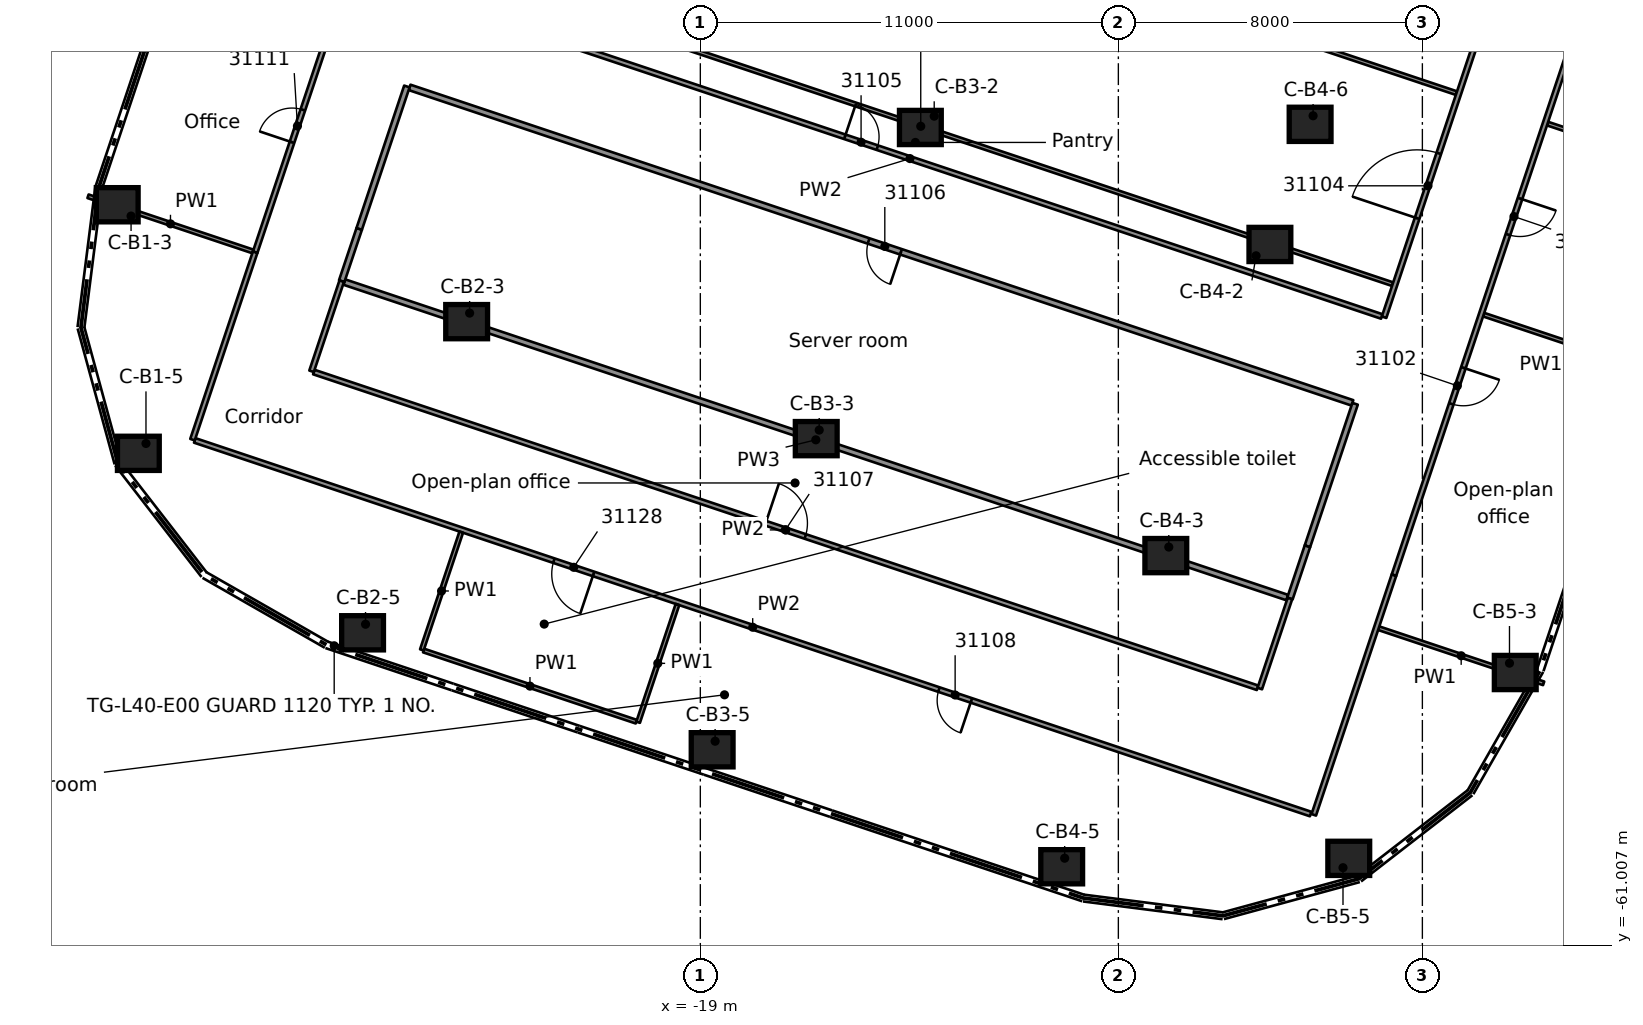
"""IFC4 building model, lengths in metres.
Left out: names, types, materials, properties, quantities, classifications, styles, units other than length and angle.
Written with IfcOpenShell. Run it as: python <this file> out.ifc"""

import sys

from ifc_helpers import new_model, si_unit, direction, frame, frame_2d, origin, origin_2d, place, context, subcontext, project, spatial, rectangle, extrude, element, fill, save


model = new_model("IFC4")
c1 = context("Model", 3, precision=1e-05, world=origin(), true_north=direction((0.0, 1.0)))
c2 = subcontext(c1, "Body", "Model", "MODEL_VIEW")
j1 = project(units=[si_unit("LENGTHUNIT", "METRE"), si_unit("PLANEANGLEUNIT", "RADIAN")], contexts=[c1])
p1 = place(None, origin())
s1 = spatial("IfcSite", under=j1, at=p1, CompositionType="ELEMENT")
p2 = place(p1, origin())
s2 = spatial("IfcBuilding", under=s1, at=p2, CompositionType="ELEMENT")
p3 = place(p2, frame((0.0, 0.0, 156.1)))
s3 = spatial("IfcBuildingStorey", under=s2, at=p3, CompositionType="ELEMENT", Elevation=156.1)
for number, where, z_axis, x_axis in (
    (1, (-34.344, -41.515, 0.0), (0.0, 0.0, 1.0), (1.0, 0.0, 0.0)),
    (2, (-33.788, -48.056, 0.0), (0.0, 0.0, 1.0), (1.0, 0.0, 0.0)),
    (3, (-25.149, -44.591, 0.0), (0.0, 0.0, 1.0), (1.0, 0.0, 0.0)),
    (4, (-27.888, -52.778, 0.0), (0.0, 0.0, 1.0), (1.0, 0.0, 0.0)),
    (5, (-13.21, -39.482, 0.0), (0.0, 0.0, 1.0), (1.0, 0.0, 0.0)),
    (6, (-15.95, -47.669, 0.0), (0.0, 0.0, 1.0), (1.0, 0.0, 0.0)),
    (7, (-18.689, -55.856, 0.0), (0.0, 0.0, 1.0), (1.0, 0.0, 0.0)),
    (8, (-4.012, -42.56, 0.0), (0.0, 0.0, 1.0), (1.0, 0.0, 0.0)),
    (9, (-6.751, -50.747, 0.0), (0.0, 0.0, 1.0), (1.0, 0.0, 0.0)),
    (10, (-9.491, -58.934, 0.0), (0.0, 0.0, 1.0), (1.0, 0.0, 0.0)),
    (11, (-2.954, -39.399, 0.0), (0.0, 0.0, 1.0), (1.0, 0.0, 0.0)),
    (12, (2.444, -53.823, 0.0), (0.0, 0.0, 1.0), (1.0, 0.0, 0.0)),
    (13, (-1.937, -58.713, 0.0), (0.0, 0.0, 1.0), (1.0, 0.0, 0.0)),
):
    element("IfcColumn", number, at=place(p3, frame(where, z_axis=z_axis, x_axis=x_axis)), inside=s3, PredefinedType="COLUMN", context=c2, shape_type="SweptSolid", body=[
        extrude(rectangle(XDim=1.1, YDim=0.9, at=origin_2d()), origin(), (0.0, 0.0, 1.0), 3.5),
    ])
p4 = place(p3, frame((-26.281, -53.245, 0.0), z_axis=(0.0, 0.0, 1.0), x_axis=(0.948351779966, -0.317220587976, 0.0)))
e14 = element("IfcWall", 14, at=p4, inside=s3, PredefinedType="PARTITIONING", context=c2, shape_type="SweptSolid", body=[
    extrude(rectangle(XDim=5.901, YDim=0.1, at=frame_2d((2.95, 0.0))), origin(), (0.0, 0.0, 1.0), 3.08),
])
p5 = place(p3, frame((-2.94, -57.547, 0.0), z_axis=(0.0, 0.0, 1.0), x_axis=(-0.948265401731, 0.317478704609, 0.0)))
e15 = element("IfcWall", 15, at=p5, inside=s3, PredefinedType="PARTITIONING", context=c2, shape_type="SweptSolid", body=[
    extrude(rectangle(XDim=30.966, YDim=0.125, at=frame_2d((15.483, 0.0))), origin(), (0.0, 0.0, 1.0), 3.08),
])
p6 = place(p5, frame((9.415, 0.0, 0.0)))
e16 = element("IfcOpeningElement", 16, at=p6, cuts=e15, PredefinedType="OPENING", context=c2, shape_type="SweptSolid", body=[
    extrude(rectangle(XDim=0.9, YDim=2.1, at=frame_2d((0.45, 1.05))), frame((0.0, 0.073, 0.0), z_axis=(0.0, -1.0, 0.0), x_axis=(1.0, 0.0, 0.0)), (0.0, 0.0, 1.0), 0.145),
])
p7 = place(p5, frame((19.9, 0.0, 0.0)))
e17 = element("IfcOpeningElement", 17, at=p7, cuts=e15, PredefinedType="OPENING", context=c2, shape_type="SweptSolid", body=[
    extrude(rectangle(XDim=1.1, YDim=2.1, at=frame_2d((0.55, 1.05))), frame((0.0, 0.073, 0.0), z_axis=(0.0, -1.0, 0.0), x_axis=(1.0, 0.0, 0.0)), (0.0, 0.0, 1.0), 0.145),
])
p8 = place(p3, frame((-29.171, -45.917, 0.0), z_axis=(0.0, 0.0, 1.0), x_axis=(0.948337781815, -0.317262433299, 0.0)))
e18 = element("IfcWall", 18, at=p8, inside=s3, PredefinedType="PARTITIONING", context=c2, shape_type="SweptSolid", body=[
    extrude(rectangle(XDim=26.187, YDim=0.125, at=frame_2d((13.093, 0.0))), origin(), (0.0, 0.0, 1.0), 3.08),
])
p9 = place(p8, frame((12.538, 0.0, 0.0)))
e19 = element("IfcOpeningElement", 19, at=p9, cuts=e18, PredefinedType="OPENING", context=c2, shape_type="SweptSolid", body=[
    extrude(rectangle(XDim=1.1, YDim=2.1, at=frame_2d((0.55, 1.05))), frame((0.0, 0.073, 0.0), z_axis=(0.0, -1.0, 0.0), x_axis=(1.0, 0.0, 0.0)), (0.0, 0.0, 1.0), 0.145),
])
p10 = place(p3, frame((-35.112, -41.292, 0.0), z_axis=(0.0, 0.0, 1.0), x_axis=(0.94831984375, -0.317316047419, 0.0)))
e20 = element("IfcWall", 20, at=p10, inside=s3, PredefinedType="PARTITIONING", context=c2, shape_type="SweptSolid", body=[
    extrude(rectangle(XDim=4.576, YDim=0.1, at=frame_2d((2.288, 0.0))), origin(), (0.0, 0.0, 1.0), 3.08),
])
p11 = place(p3, frame((-28.366, -43.55, 0.0), z_axis=(0.0, 0.0, 1.0), x_axis=(0.948327152728, -0.317294203223, 0.0)))
e21 = element("IfcWall", 21, at=p11, inside=s3, PredefinedType="PARTITIONING", context=c2, shape_type="SweptSolid", body=[
    extrude(rectangle(XDim=26.162, YDim=0.15, at=frame_2d((13.081, 0.0))), origin(), (0.0, 0.0, 1.0), 3.08),
])
p12 = place(p3, frame((-1.149, -52.657, 0.0), z_axis=(0.0, 0.0, 1.0), x_axis=(0.948400148701, -0.317075949805, 0.0)))
e22 = element("IfcWall", 22, at=p12, inside=s3, PredefinedType="PARTITIONING", context=c2, shape_type="SweptSolid", body=[
    extrude(rectangle(XDim=4.576, YDim=0.1, at=frame_2d((2.288, 0.0))), origin(), (0.0, 0.0, 1.0), 3.08),
])
p13 = place(p3, frame((-1.841, -46.728, 0.0), z_axis=(0.0, 0.0, 1.0), x_axis=(-0.94832621322, 0.317297011205, 0.0)))
e23 = element("IfcWall", 23, at=p13, inside=s3, PredefinedType="PARTITIONING", context=c2, shape_type="SweptSolid", body=[
    extrude(rectangle(XDim=26.162, YDim=0.15, at=frame_2d((13.081, 0.0))), origin(), (0.0, 0.0, 1.0), 3.08),
])
p14 = place(p13, frame((12.525, 0.0, 0.0)))
e24 = element("IfcOpeningElement", 24, at=p14, cuts=e23, PredefinedType="OPENING", context=c2, shape_type="SweptSolid", body=[
    extrude(rectangle(XDim=0.9, YDim=2.1, at=frame_2d((0.45, 1.05))), frame((0.0, 0.085, 0.0), z_axis=(0.0, -1.0, 0.0), x_axis=(1.0, 0.0, 0.0)), (0.0, 0.0, 1.0), 0.17),
])
p15 = place(p3, frame((-25.901, -36.146, 0.0), z_axis=(0.0, 0.0, 1.0), x_axis=(0.948326561211, -0.317295971139, 0.0)))
e25 = element("IfcWall", 25, at=p15, inside=s3, PredefinedType="PARTITIONING", context=c2, shape_type="SweptSolid", body=[
    extrude(rectangle(XDim=26.187, YDim=0.125, at=frame_2d((13.094, 0.0))), origin(), (0.0, 0.0, 1.0), 3.08),
])
p16 = place(p15, frame((11.288, 0.0, 0.0)))
e26 = element("IfcOpeningElement", 26, at=p16, cuts=e25, PredefinedType="OPENING", context=c2, shape_type="SweptSolid", body=[
    extrude(rectangle(XDim=0.9, YDim=2.1, at=frame_2d((0.45, 1.05))), frame((0.0, 0.073, 0.0), z_axis=(0.0, -1.0, 0.0), x_axis=(1.0, 0.0, 0.0)), (0.0, 0.0, 1.0), 0.145),
])
p17 = place(p3, frame((-25.617, -35.296, 0.0), z_axis=(0.0, 0.0, 1.0), x_axis=(0.948326561211, -0.317295971139, 0.0)))
e27 = element("IfcWall", 27, at=p17, inside=s3, PredefinedType="PARTITIONING", context=c2, shape_type="SweptSolid", body=[
    extrude(rectangle(XDim=26.187, YDim=0.1, at=frame_2d((13.094, 0.0))), origin(), (0.0, 0.0, 1.0), 3.08),
])
p18 = place(p3, frame((1.612, -44.407, 0.0), z_axis=(0.0, 0.0, 1.0), x_axis=(0.948334710824, -0.317271612734, 0.0)))
e28 = element("IfcWall", 28, at=p18, inside=s3, PredefinedType="PARTITIONING", context=c2, shape_type="SweptSolid", body=[
    extrude(rectangle(XDim=4.63, YDim=0.1, at=frame_2d((2.315, 0.0))), origin(), (0.0, 0.0, 1.0), 3.08),
])
p19 = place(p3, frame((-23.935, -30.27, 0.0), z_axis=(0.0, 0.0, 1.0), x_axis=(0.948326561211, -0.317295971139, 0.0)))
e29 = element("IfcWall", 29, at=p19, inside=s3, PredefinedType="PARTITIONING", context=c2, shape_type="SweptSolid", body=[
    extrude(rectangle(XDim=26.187, YDim=0.1, at=frame_2d((13.094, 0.0))), origin(), (0.0, 0.0, 1.0), 3.08),
])
p20 = place(p3, frame((3.294, -39.38, 0.0), z_axis=(0.0, 0.0, 1.0), x_axis=(0.948260676976, -0.317492816455, 0.0)))
e30 = element("IfcWall", 30, at=p20, inside=s3, PredefinedType="PARTITIONING", context=c2, shape_type="SweptSolid", body=[
    extrude(rectangle(XDim=4.631, YDim=0.1, at=frame_2d((2.315, 0.0))), origin(), (0.0, 0.0, 1.0), 3.08),
])
p21 = place(p3, frame((-2.858, -57.568, 0.0), z_axis=(0.0, 0.0, 1.0), x_axis=(0.317328623894, 0.94831563546, 0.0)))
e31 = element("IfcWall", 31, at=p21, inside=s3, PredefinedType="PARTITIONING", context=c2, shape_type="SweptSolid", body=[
    extrude(rectangle(XDim=6.652, YDim=0.125, at=frame_2d((3.326, 0.0))), origin(), (0.0, 0.0, 1.0), 3.08),
])
p22 = place(p3, frame((5.014, -34.047, 0.0), z_axis=(0.0, 0.0, 1.0), x_axis=(-0.317385597106, -0.948296568986, 0.0)))
e32 = element("IfcWall", 32, at=p22, inside=s3, PredefinedType="PARTITIONING", context=c2, shape_type="SweptSolid", body=[
    extrude(rectangle(XDim=18.151, YDim=0.125, at=frame_2d((9.076, 0.0))), origin(), (0.0, 0.0, 1.0), 3.08),
])
p23 = place(p22, frame((2.347, 0.0, 0.0)))
e33 = element("IfcOpeningElement", 33, at=p23, cuts=e32, PredefinedType="OPENING", context=c2, shape_type="SweptSolid", body=[
    extrude(rectangle(XDim=0.9, YDim=2.1, at=frame_2d((0.45, 1.05))), frame((0.0, 0.073, 0.0), z_axis=(0.0, -1.0, 0.0), x_axis=(1.0, 0.0, 0.0)), (0.0, 0.0, 1.0), 0.145),
])
p24 = place(p22, frame((7.703, 0.0, 0.0)))
e34 = element("IfcOpeningElement", 34, at=p24, cuts=e32, PredefinedType="OPENING", context=c2, shape_type="SweptSolid", body=[
    extrude(rectangle(XDim=1.0, YDim=2.1, at=frame_2d((0.5, 1.05))), frame((0.0, 0.073, 0.0), z_axis=(0.0, -1.0, 0.0), x_axis=(1.0, 0.0, 0.0)), (0.0, 0.0, 1.0), 0.145),
])
p25 = place(p22, frame((12.399, 0.0, 0.0)))
e35 = element("IfcOpeningElement", 35, at=p25, cuts=e32, PredefinedType="OPENING", context=c2, shape_type="SweptSolid", body=[
    extrude(rectangle(XDim=1.0, YDim=2.1, at=frame_2d((0.5, 1.05))), frame((0.0, 0.073, 0.0), z_axis=(0.0, -1.0, 0.0), x_axis=(1.0, 0.0, 0.0)), (0.0, 0.0, 1.0), 0.145),
])
p26 = place(p3, frame((-3.485, -51.875, 0.0), z_axis=(0.0, 0.0, 1.0), x_axis=(0.317791901712, 0.948160485997, 0.0)))
e36 = element("IfcWall", 36, at=p26, inside=s3, PredefinedType="PARTITIONING", context=c2, shape_type="SweptSolid", body=[
    extrude(rectangle(XDim=1.451, YDim=0.15, at=frame_2d((0.726, 0.0))), origin(), (0.0, 0.0, 1.0), 3.08),
])
p27 = place(p3, frame((-4.278, -54.245, 0.0), z_axis=(0.0, 0.0, 1.0), x_axis=(0.31728257411, 0.948331043553, 0.0)))
e37 = element("IfcWall", 37, at=p27, inside=s3, PredefinedType="PARTITIONING", context=c2, shape_type="SweptSolid", body=[
    extrude(rectangle(XDim=2.499, YDim=0.125, at=frame_2d((1.25, 0.0))), origin(), (0.0, 0.0, 1.0), 3.08),
])
p28 = place(p3, frame((-3.024, -50.499, 0.0), z_axis=(0.0, 0.0, 1.0), x_axis=(0.317339720629, 0.94831192216, 0.0)))
e38 = element("IfcWall", 38, at=p28, inside=s3, PredefinedType="PARTITIONING", context=c2, shape_type="SweptSolid", body=[
    extrude(rectangle(XDim=3.951, YDim=0.15, at=frame_2d((1.976, 0.0))), origin(), (0.0, 0.0, 1.0), 3.08),
])
p29 = place(p3, frame((-1.008, -44.475, 0.0), z_axis=(0.0, 0.0, 1.0), x_axis=(0.316889155775, 0.948462578572, 0.0)))
e39 = element("IfcWall", 39, at=p29, inside=s3, PredefinedType="PARTITIONING", context=c2, shape_type="SweptSolid", body=[
    extrude(rectangle(XDim=11.516, YDim=0.125, at=frame_2d((5.758, 0.0))), origin(), (0.0, 0.0, 1.0), 3.08),
])
p30 = place(p29, frame((2.746, 0.0, 0.0)))
e40 = element("IfcOpeningElement", 40, at=p30, cuts=e39, PredefinedType="OPENING", context=c2, shape_type="SweptSolid", body=[
    extrude(rectangle(XDim=1.8, YDim=2.1, at=frame_2d((0.9, 1.05))), frame((0.0, 0.073, 0.0), z_axis=(0.0, -1.0, 0.0), x_axis=(1.0, 0.0, 0.0)), (0.0, 0.0, 1.0), 0.145),
])
p31 = place(p3, frame((-20.637, -55.132, 0.0), z_axis=(0.0, 0.0, 1.0), x_axis=(0.316922325985, 0.948451495487, 0.0)))
e41 = element("IfcWall", 41, at=p31, inside=s3, PredefinedType="PARTITIONING", context=c2, shape_type="SweptSolid", body=[
    extrude(rectangle(XDim=3.269, YDim=0.1, at=frame_2d((1.634, 0.0))), origin(), (0.0, 0.0, 1.0), 3.08),
])
p32 = place(p3, frame((-26.328, -53.228, 0.0), z_axis=(0.0, 0.0, 1.0), x_axis=(0.317191051156, 0.948361659425, 0.0)))
e42 = element("IfcWall", 42, at=p32, inside=s3, PredefinedType="PARTITIONING", context=c2, shape_type="SweptSolid", body=[
    extrude(rectangle(XDim=3.269, YDim=0.1, at=frame_2d((1.634, 0.0))), origin(), (0.0, 0.0, 1.0), 3.08),
])
p33 = place(p3, frame((-28.437, -43.526, 0.0), z_axis=(0.0, 0.0, 1.0), x_axis=(0.317640646832, 0.94821116819, 0.0)))
e43 = element("IfcWall", 43, at=p33, inside=s3, PredefinedType="PARTITIONING", context=c2, shape_type="SweptSolid", body=[
    extrude(rectangle(XDim=1.451, YDim=0.15, at=frame_2d((0.726, 0.0))), origin(), (0.0, 0.0, 1.0), 3.08),
])
p34 = place(p3, frame((-27.976, -42.15, 0.0), z_axis=(0.0, 0.0, 1.0), x_axis=(0.317413881712, 0.948287101935, 0.0)))
e44 = element("IfcWall", 44, at=p34, inside=s3, PredefinedType="PARTITIONING", context=c2, shape_type="SweptSolid", body=[
    extrude(rectangle(XDim=3.951, YDim=0.15, at=frame_2d((1.976, 0.0))), origin(), (0.0, 0.0, 1.0), 3.08),
])
p35 = place(p3, frame((-29.23, -45.897, 0.0), z_axis=(0.0, 0.0, 1.0), x_axis=(0.317165045262, 0.948370357015, 0.0)))
e45 = element("IfcWall", 45, at=p35, inside=s3, PredefinedType="PARTITIONING", context=c2, shape_type="SweptSolid", body=[
    extrude(rectangle(XDim=2.5, YDim=0.125, at=frame_2d((1.25, 0.0))), origin(), (0.0, 0.0, 1.0), 3.08),
])
p36 = place(p3, frame((-30.714, -42.764, 0.0), z_axis=(0.0, 0.0, 1.0), x_axis=(0.317699123241, 0.94819157721, 0.0)))
e46 = element("IfcWall", 46, at=p36, inside=s3, PredefinedType="PARTITIONING", context=c2, shape_type="SweptSolid", body=[
    extrude(rectangle(XDim=19.906, YDim=0.125, at=frame_2d((9.953, 0.0))), origin(), (0.0, 0.0, 1.0), 3.08),
])
p37 = place(p36, frame((16.35, 0.0, 0.0)))
e47 = element("IfcOpeningElement", 47, at=p37, cuts=e46, PredefinedType="OPENING", context=c2, shape_type="SweptSolid", body=[
    extrude(rectangle(XDim=0.9, YDim=2.1, at=frame_2d((0.45, 1.05))), frame((0.0, 0.073, 0.0), z_axis=(0.0, -1.0, 0.0), x_axis=(1.0, 0.0, 0.0)), (0.0, 0.0, 1.0), 0.145),
])
p38 = place(p36, frame((10.8, 0.0, 0.0)))
e48 = element("IfcOpeningElement", 48, at=p38, cuts=e46, PredefinedType="OPENING", context=c2, shape_type="SweptSolid", body=[
    extrude(rectangle(XDim=0.9, YDim=2.1, at=frame_2d((0.45, 1.05))), frame((0.0, 0.073, 0.0), z_axis=(0.0, -1.0, 0.0), x_axis=(1.0, 0.0, 0.0)), (0.0, 0.0, 1.0), 0.145),
])
p39 = place(p36, frame((3.051, 0.0, 0.0)))
e49 = element("IfcOpeningElement", 49, at=p39, cuts=e46, PredefinedType="OPENING", context=c2, shape_type="SweptSolid", body=[
    extrude(rectangle(XDim=0.9, YDim=2.1, at=frame_2d((0.45, 1.05))), frame((0.0, 0.073, 0.0), z_axis=(0.0, -1.0, 0.0), x_axis=(1.0, 0.0, 0.0)), (0.0, 0.0, 1.0), 0.145),
])
p40 = place(p3, frame((-30.715, -42.765, 0.0), z_axis=(0.0, 0.0, 1.0), x_axis=(-0.31696020199, -0.948438838489, 0.0)))
e50 = element("IfcWall", 50, at=p40, inside=s3, PredefinedType="PARTITIONING", context=c2, shape_type="SweptSolid", body=[
    extrude(rectangle(XDim=5.199, YDim=0.125, at=frame_2d((2.6, 0.0))), origin(), (0.0, 0.0, 1.0), 3.08),
])
p41 = place(p24, origin())
e51 = element("IfcDoor", 51, at=p41, inside=s3, OperationType="SINGLE_SWING_LEFT", PredefinedType="DOOR", context=c2, shape_type="SweptSolid", body=[
    extrude(rectangle(XDim=1.0, YDim=2.1, at=frame_2d((0.5, 1.05))), frame((0.0, 0.025, 0.0), z_axis=(0.0, -1.0, 0.0), x_axis=(1.0, 0.0, 0.0)), (0.0, 0.0, 1.0), 0.05),
])
fill(e34, e51)
p42 = place(p25, origin())
e52 = element("IfcDoor", 52, at=p42, inside=s3, OperationType="SINGLE_SWING_RIGHT", PredefinedType="DOOR", context=c2, shape_type="SweptSolid", body=[
    extrude(rectangle(XDim=1.0, YDim=2.1, at=frame_2d((0.5, 1.05))), frame((0.0, 0.025, 0.0), z_axis=(0.0, -1.0, 0.0), x_axis=(1.0, 0.0, 0.0)), (0.0, 0.0, 1.0), 0.05),
])
fill(e35, e52)
p43 = place(p30, origin())
e53 = element("IfcDoor", 53, at=p43, inside=s3, OperationType="DOUBLE_DOOR_SINGLE_SWING", PredefinedType="DOOR", context=c2, shape_type="SweptSolid", body=[
    extrude(rectangle(XDim=1.8, YDim=2.1, at=frame_2d((0.9, 1.05))), frame((0.0, 0.025, 0.0), z_axis=(0.0, -1.0, 0.0), x_axis=(1.0, 0.0, 0.0)), (0.0, 0.0, 1.0), 0.05),
])
fill(e40, e53)
p44 = place(p16, origin())
e54 = element("IfcDoor", 54, at=p44, inside=s3, OperationType="SINGLE_SWING_LEFT", PredefinedType="DOOR", context=c2, shape_type="SweptSolid", body=[
    extrude(rectangle(XDim=0.9, YDim=2.1, at=frame_2d((0.45, 1.05))), frame((0.0, 0.025, 0.0), z_axis=(0.0, -1.0, 0.0), x_axis=(1.0, 0.0, 0.0)), (0.0, 0.0, 1.0), 0.05),
])
fill(e26, e54)
p45 = place(p14, origin())
e55 = element("IfcDoor", 55, at=p45, inside=s3, OperationType="SINGLE_SWING_LEFT", PredefinedType="DOOR", context=c2, shape_type="SweptSolid", body=[
    extrude(rectangle(XDim=0.9, YDim=2.1, at=frame_2d((0.45, 1.05))), frame((0.0, 0.025, 0.0), z_axis=(0.0, -1.0, 0.0), x_axis=(1.0, 0.0, 0.0)), (0.0, 0.0, 1.0), 0.05),
])
fill(e24, e55)
p46 = place(p9, origin())
e56 = element("IfcDoor", 56, at=p46, inside=s3, OperationType="SINGLE_SWING_LEFT", PredefinedType="DOOR", context=c2, shape_type="SweptSolid", body=[
    extrude(rectangle(XDim=1.1, YDim=2.1, at=frame_2d((0.55, 1.05))), frame((0.0, 0.025, 0.0), z_axis=(0.0, -1.0, 0.0), x_axis=(1.0, 0.0, 0.0)), (0.0, 0.0, 1.0), 0.05),
])
fill(e19, e56)
p47 = place(p6, origin())
e57 = element("IfcDoor", 57, at=p47, inside=s3, OperationType="SINGLE_SWING_LEFT", PredefinedType="DOOR", context=c2, shape_type="SweptSolid", body=[
    extrude(rectangle(XDim=0.9, YDim=2.1, at=frame_2d((0.45, 1.05))), frame((0.0, 0.025, 0.0), z_axis=(0.0, -1.0, 0.0), x_axis=(1.0, 0.0, 0.0)), (0.0, 0.0, 1.0), 0.05),
])
fill(e16, e57)
p48 = place(p39, origin())
e58 = element("IfcDoor", 58, at=p48, inside=s3, OperationType="SINGLE_SWING_LEFT", PredefinedType="DOOR", context=c2, shape_type="SweptSolid", body=[
    extrude(rectangle(XDim=0.9, YDim=2.1, at=frame_2d((0.45, 1.05))), frame((0.0, 0.025, 0.0), z_axis=(0.0, -1.0, 0.0), x_axis=(1.0, 0.0, 0.0)), (0.0, 0.0, 1.0), 0.05),
])
fill(e49, e58)
p49 = place(p7, origin())
e59 = element("IfcDoor", 59, at=p49, inside=s3, OperationType="SINGLE_SWING_RIGHT", PredefinedType="DOOR", context=c2, shape_type="SweptSolid", body=[
    extrude(rectangle(XDim=1.1, YDim=2.1, at=frame_2d((0.55, 1.05))), frame((0.0, 0.025, 0.0), z_axis=(0.0, -1.0, 0.0), x_axis=(1.0, 0.0, 0.0)), (0.0, 0.0, 1.0), 0.05),
])
fill(e17, e59)
save(model, sys.argv[1])
